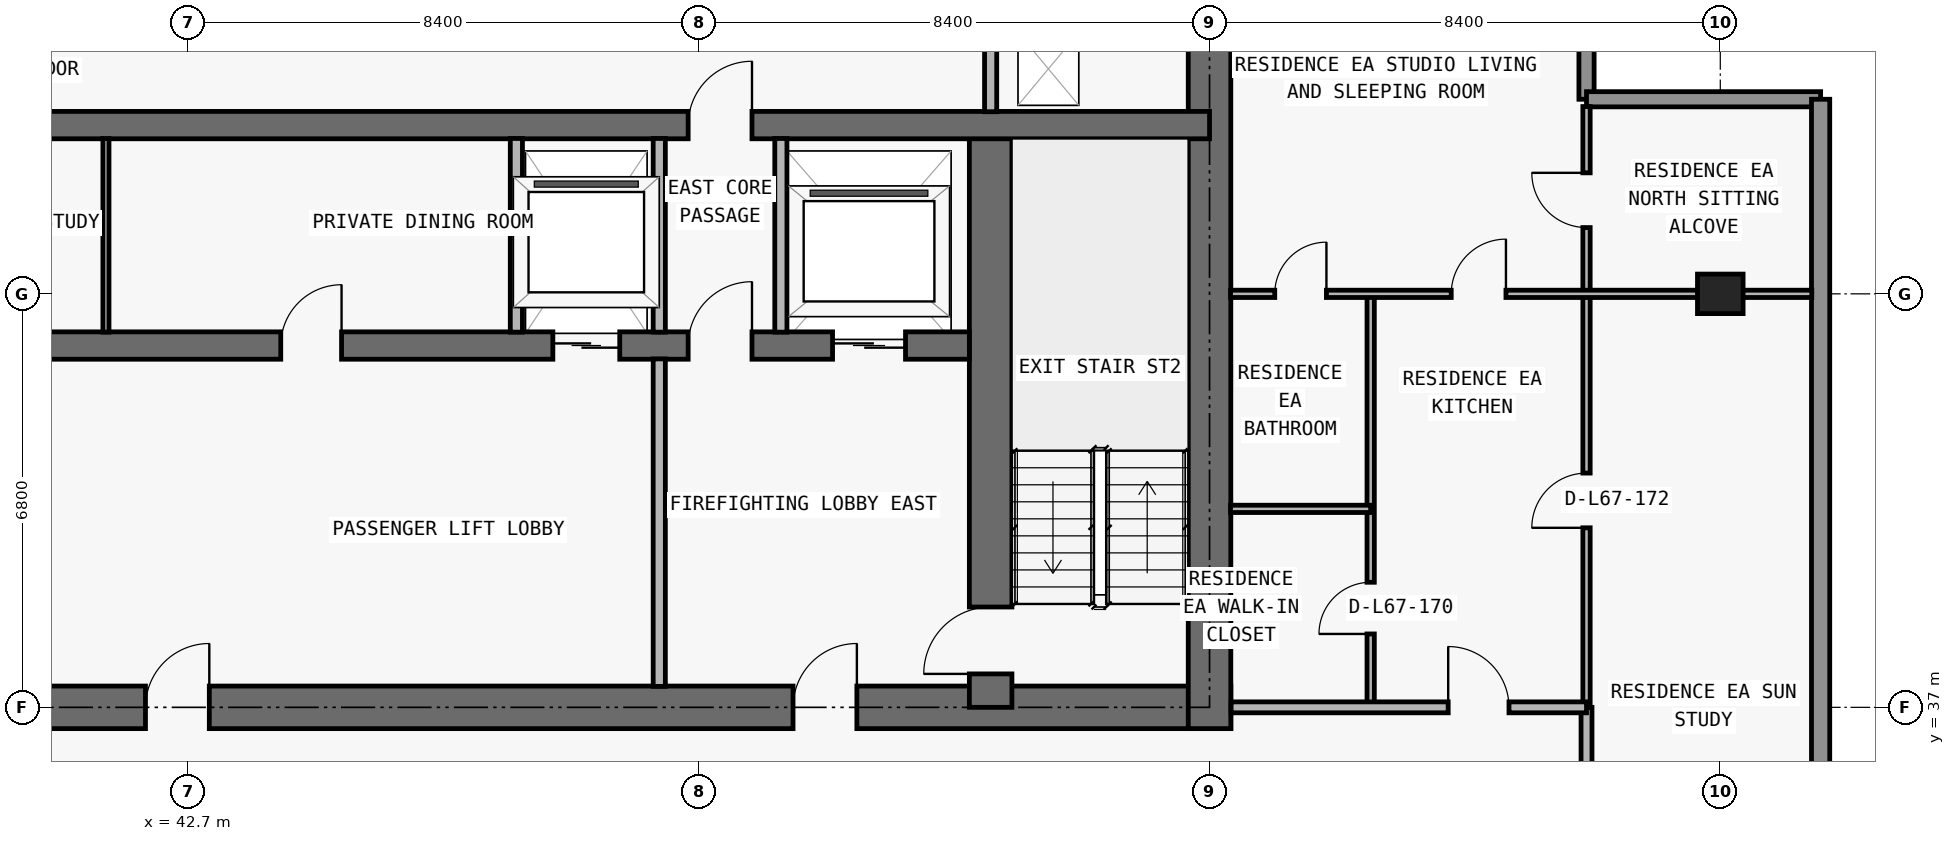
"""IFC4 building model, lengths in metres.
Left out: names, types, materials, properties, quantities, classifications, styles, units other than length and angle.
Written with IfcOpenShell. Run it as: python <this file> out.ifc"""

import sys

from ifc_helpers import new_model, si_unit, direction, frame, frame_2d, origin, origin_2d, place, context, subcontext, project, spatial, rectangle, extrude, element, fill, save


model = new_model("IFC4")
c1 = context("Model", 3, precision=1e-05, world=origin(), true_north=direction((0.0, 1.0)))
c2 = subcontext(c1, "Body", "Model", "MODEL_VIEW")
j1 = project(units=[si_unit("LENGTHUNIT", "METRE"), si_unit("PLANEANGLEUNIT", "RADIAN")], contexts=[c1])
p1 = place(None, origin())
s1 = spatial("IfcSite", under=j1, at=p1, CompositionType="ELEMENT")
p2 = place(p1, origin())
s2 = spatial("IfcBuilding", under=s1, at=p2, CompositionType="ELEMENT")
p3 = place(p2, frame((0.0, 0.0, 239.7)))
s3 = spatial("IfcBuildingStorey", under=s2, at=p3, CompositionType="ELEMENT", Elevation=239.7)
p4 = place(p3, frame((67.9, 43.8, 0.0), z_axis=(0.0, 0.0, 1.0), x_axis=(1.0, 0.0, 0.0)))
e1 = element("IfcColumn", 1, at=p4, inside=s3, PredefinedType="COLUMN", context=c2, shape_type="SweptSolid", body=[
    extrude(rectangle(XDim=0.75, YDim=0.65, at=origin_2d()), origin(), (0.0, 0.0, 1.0), 3.05),
])
p5 = place(p3, frame((17.95, 37.0, 0.0), z_axis=(0.0, 0.0, 1.0), x_axis=(1.0, 0.0, 0.0)))
e2 = element("IfcWall", 2, at=p5, inside=s3, PredefinedType="SHEAR", context=c2, shape_type="SweptSolid", body=[
    extrude(rectangle(XDim=41.9, YDim=0.7, at=frame_2d((20.95, 0.0))), origin(), (0.0, 0.0, 1.0), 3.05),
])
p6 = place(p5, frame((14.35, 0.0, 0.0)))
e3 = element("IfcOpeningElement", 3, at=p6, cuts=e2, PredefinedType="OPENING", context=c2, shape_type="SweptSolid", body=[
    extrude(rectangle(XDim=1.1, YDim=2.15, at=frame_2d((0.55, 1.075))), frame((0.0, 0.36, 0.0), z_axis=(0.0, -1.0, 0.0), x_axis=(1.0, 0.0, 0.0)), (0.0, 0.0, 1.0), 0.72),
])
p7 = place(p5, frame((6.2, 0.0, 0.0)))
e4 = element("IfcOpeningElement", 4, at=p7, cuts=e2, PredefinedType="OPENING", context=c2, shape_type="SweptSolid", body=[
    extrude(rectangle(XDim=1.05, YDim=2.15, at=frame_2d((0.525, 1.075))), frame((0.0, 0.36, 0.0), z_axis=(0.0, -1.0, 0.0), x_axis=(1.0, 0.0, 0.0)), (0.0, 0.0, 1.0), 0.72),
])
p8 = place(p5, frame((34.7, 0.0, 0.0)))
e5 = element("IfcOpeningElement", 5, at=p8, cuts=e2, PredefinedType="OPENING", context=c2, shape_type="SweptSolid", body=[
    extrude(rectangle(XDim=1.05, YDim=2.15, at=frame_2d((0.525, 1.075))), frame((0.0, 0.36, 0.0), z_axis=(0.0, -1.0, 0.0), x_axis=(1.0, 0.0, 0.0)), (0.0, 0.0, 1.0), 0.72),
])
p9 = place(p5, frame((10.812, 0.0, 0.0)))
e6 = element("IfcOpeningElement", 6, at=p9, cuts=e2, PredefinedType="OPENING", context=c2, shape_type="SweptSolid", body=[
    extrude(rectangle(XDim=1.05, YDim=2.15, at=frame_2d((0.525, 1.075))), frame((0.0, 0.36, 0.0), z_axis=(0.0, -1.0, 0.0), x_axis=(1.0, 0.0, 0.0)), (0.0, 0.0, 1.0), 0.72),
])
p10 = place(p5, frame((24.05, 0.0, 0.0)))
e7 = element("IfcOpeningElement", 7, at=p10, cuts=e2, PredefinedType="OPENING", context=c2, shape_type="SweptSolid", body=[
    extrude(rectangle(XDim=1.05, YDim=2.15, at=frame_2d((0.525, 1.075))), frame((0.0, 0.36, 0.0), z_axis=(0.0, -1.0, 0.0), x_axis=(1.0, 0.0, 0.0)), (0.0, 0.0, 1.0), 0.72),
])
p11 = place(p3, frame((59.5, 36.65, 0.0), z_axis=(0.0, 0.0, 1.0), x_axis=(0.0, 1.0, 0.0)))
e8 = element("IfcWall", 8, at=p11, inside=s3, PredefinedType="SHEAR", context=c2, shape_type="SweptSolid", body=[
    extrude(rectangle(XDim=13.95, YDim=0.7, at=frame_2d((6.975, 0.0))), origin(), (0.0, 0.0, 1.0), 3.05),
])
p12 = place(p3, frame((55.9, 37.0, 0.0), z_axis=(0.0, 0.0, 1.0), x_axis=(0.0, 1.0, 0.0)))
e9 = element("IfcWall", 9, at=p12, inside=s3, PredefinedType="SHEAR", context=c2, shape_type="SweptSolid", body=[
    extrude(rectangle(XDim=9.575, YDim=0.7, at=frame_2d((4.788, 0.0))), origin(), (0.0, 0.0, 1.0), 3.05),
])
p13 = place(p12, frame((0.55, 0.0, 0.0)))
e10 = element("IfcOpeningElement", 10, at=p13, cuts=e9, PredefinedType="OPENING", context=c2, shape_type="SweptSolid", body=[
    extrude(rectangle(XDim=1.1, YDim=2.15, at=frame_2d((0.55, 1.075))), frame((0.0, 0.36, 0.0), z_axis=(0.0, -1.0, 0.0), x_axis=(1.0, 0.0, 0.0)), (0.0, 0.0, 1.0), 0.72),
])
p14 = place(p3, frame((22.25, 42.95, 0.0), z_axis=(0.0, 0.0, 1.0), x_axis=(1.0, 0.0, 0.0)))
e11 = element("IfcWall", 11, at=p14, inside=s3, PredefinedType="SHEAR", context=c2, shape_type="SweptSolid", body=[
    extrude(rectangle(XDim=33.3, YDim=0.45, at=frame_2d((16.65, 0.0))), origin(), (0.0, 0.0, 1.0), 3.05),
])
p15 = place(p14, frame((1.05, 0.0, 0.0)))
e12 = element("IfcOpeningElement", 12, at=p15, cuts=e11, PredefinedType="OPENING", context=c2, shape_type="SweptSolid", body=[
    extrude(rectangle(XDim=1.2, YDim=2.2, at=frame_2d((0.6, 1.1))), frame((0.0, 0.235, 0.0), z_axis=(0.0, -1.0, 0.0), x_axis=(1.0, 0.0, 0.0)), (0.0, 0.0, 1.0), 0.47),
])
p16 = place(p14, frame((31.05, 0.0, 0.0)))
e13 = element("IfcOpeningElement", 13, at=p16, cuts=e11, PredefinedType="OPENING", context=c2, shape_type="SweptSolid", body=[
    extrude(rectangle(XDim=1.2, YDim=2.2, at=frame_2d((0.6, 1.1))), frame((0.0, 0.235, 0.0), z_axis=(0.0, -1.0, 0.0), x_axis=(1.0, 0.0, 0.0)), (0.0, 0.0, 1.0), 0.47),
])
p17 = place(p14, frame((26.45, 0.0, 0.0)))
e14 = element("IfcOpeningElement", 14, at=p17, cuts=e11, PredefinedType="OPENING", context=c2, shape_type="SweptSolid", body=[
    extrude(rectangle(XDim=1.1, YDim=2.2, at=frame_2d((0.55, 1.1))), frame((0.0, 0.235, 0.0), z_axis=(0.0, -1.0, 0.0), x_axis=(1.0, 0.0, 0.0)), (0.0, 0.0, 1.0), 0.47),
])
p18 = place(p14, frame((5.95, 0.0, 0.0)))
e15 = element("IfcOpeningElement", 15, at=p18, cuts=e11, PredefinedType="OPENING", context=c2, shape_type="SweptSolid", body=[
    extrude(rectangle(XDim=1.1, YDim=2.2, at=frame_2d((0.55, 1.1))), frame((0.0, 0.235, 0.0), z_axis=(0.0, -1.0, 0.0), x_axis=(1.0, 0.0, 0.0)), (0.0, 0.0, 1.0), 0.47),
])
p19 = place(p14, frame((3.625, 0.0, 0.0)))
e16 = element("IfcOpeningElement", 16, at=p19, cuts=e11, PredefinedType="OPENING", context=c2, shape_type="SweptSolid", body=[
    extrude(rectangle(XDim=1.05, YDim=2.15, at=frame_2d((0.525, 1.075))), frame((0.0, 0.235, 0.0), z_axis=(0.0, -1.0, 0.0), x_axis=(1.0, 0.0, 0.0)), (0.0, 0.0, 1.0), 0.47),
])
p20 = place(p14, frame((28.675, 0.0, 0.0)))
e17 = element("IfcOpeningElement", 17, at=p20, cuts=e11, PredefinedType="OPENING", context=c2, shape_type="SweptSolid", body=[
    extrude(rectangle(XDim=1.05, YDim=2.15, at=frame_2d((0.525, 1.075))), frame((0.0, 0.235, 0.0), z_axis=(0.0, -1.0, 0.0), x_axis=(1.0, 0.0, 0.0)), (0.0, 0.0, 1.0), 0.47),
])
p21 = place(p14, frame((15.225, 0.0, 0.0)))
e18 = element("IfcOpeningElement", 18, at=p21, cuts=e11, PredefinedType="OPENING", context=c2, shape_type="SweptSolid", body=[
    extrude(rectangle(XDim=1.0, YDim=2.2, at=frame_2d((0.5, 1.1))), frame((0.0, 0.235, 0.0), z_axis=(0.0, -1.0, 0.0), x_axis=(1.0, 0.0, 0.0)), (0.0, 0.0, 1.0), 0.47),
])
p22 = place(p14, frame((21.975, 0.0, 0.0)))
e19 = element("IfcOpeningElement", 19, at=p22, cuts=e11, PredefinedType="OPENING", context=c2, shape_type="SweptSolid", body=[
    extrude(rectangle(XDim=1.0, YDim=2.2, at=frame_2d((0.5, 1.1))), frame((0.0, 0.235, 0.0), z_axis=(0.0, -1.0, 0.0), x_axis=(1.0, 0.0, 0.0)), (0.0, 0.0, 1.0), 0.47),
])
p23 = place(p3, frame((18.3, 46.575, 0.0), z_axis=(0.0, 0.0, 1.0), x_axis=(1.0, 0.0, 0.0)))
e20 = element("IfcWall", 20, at=p23, inside=s3, PredefinedType="SHEAR", context=c2, shape_type="SweptSolid", body=[
    extrude(rectangle(XDim=41.2, YDim=0.45, at=frame_2d((20.6, 0.0))), origin(), (0.0, 0.0, 1.0), 3.05),
])
p24 = place(p23, frame((7.575, 0.0, 0.0)))
e21 = element("IfcOpeningElement", 21, at=p24, cuts=e20, PredefinedType="OPENING", context=c2, shape_type="SweptSolid", body=[
    extrude(rectangle(XDim=1.05, YDim=2.15, at=frame_2d((0.525, 1.075))), frame((0.0, 0.235, 0.0), z_axis=(0.0, -1.0, 0.0), x_axis=(1.0, 0.0, 0.0)), (0.0, 0.0, 1.0), 0.47),
])
p25 = place(p23, frame((32.625, 0.0, 0.0)))
e22 = element("IfcOpeningElement", 22, at=p25, cuts=e20, PredefinedType="OPENING", context=c2, shape_type="SweptSolid", body=[
    extrude(rectangle(XDim=1.05, YDim=2.15, at=frame_2d((0.525, 1.075))), frame((0.0, 0.235, 0.0), z_axis=(0.0, -1.0, 0.0), x_axis=(1.0, 0.0, 0.0)), (0.0, 0.0, 1.0), 0.47),
])
p26 = place(p3, frame((65.7, 50.45, 0.0), z_axis=(0.0, 0.0, 1.0), x_axis=(0.0, -1.0, 0.0)))
e23 = element("IfcWall", 23, at=p26, inside=s3, PredefinedType="ELEMENTEDWALL", context=c2, shape_type="SweptSolid", body=[
    extrude(rectangle(XDim=3.45, YDim=0.25, at=frame_2d((1.725, 0.0))), origin(), (0.0, 0.0, 1.0), 3.05),
])
p27 = place(p3, frame((65.7, 47.0, 0.0), z_axis=(0.0, 0.0, 1.0), x_axis=(1.0, 0.0, 0.0)))
e24 = element("IfcWall", 24, at=p27, inside=s3, PredefinedType="ELEMENTEDWALL", context=c2, shape_type="SweptSolid", body=[
    extrude(rectangle(XDim=3.85, YDim=0.25, at=frame_2d((1.925, 0.0))), origin(), (0.0, 0.0, 1.0), 3.05),
])
p28 = place(p3, frame((69.55, 47.0, 0.0), z_axis=(0.0, 0.0, 1.0), x_axis=(0.0, -1.0, 0.0)))
e25 = element("IfcWall", 25, at=p28, inside=s3, PredefinedType="STANDARD", context=c2, shape_type="SweptSolid", body=[
    extrude(rectangle(XDim=16.85, YDim=0.3, at=frame_2d((8.425, 0.0))), origin(), (0.0, 0.0, 1.0), 3.05),
])
p29 = place(p3, frame((41.35, 43.17, 0.0), z_axis=(0.0, 0.0, 1.0), x_axis=(0.0, 1.0, 0.0)))
e26 = element("IfcWall", 26, at=p29, inside=s3, PredefinedType="MOVABLE", context=c2, shape_type="SweptSolid", body=[
    extrude(rectangle(XDim=3.185, YDim=0.1, at=frame_2d((1.593, 0.0))), origin(), (0.0, 0.0, 1.0), 3.05),
])
p30 = place(p3, frame((48.1, 43.17, 0.0), z_axis=(0.0, 0.0, 1.0), x_axis=(0.0, 1.0, 0.0)))
e27 = element("IfcWall", 27, at=p30, inside=s3, PredefinedType="PARTITIONING", context=c2, shape_type="SweptSolid", body=[
    extrude(rectangle(XDim=3.185, YDim=0.2, at=frame_2d((1.593, 0.0))), origin(), (0.0, 0.0, 1.0), 3.05),
])
p31 = place(p3, frame((50.45, 37.345, 0.0), z_axis=(0.0, 0.0, 1.0), x_axis=(0.0, 1.0, 0.0)))
e28 = element("IfcWall", 28, at=p31, inside=s3, PredefinedType="PARTITIONING", context=c2, shape_type="SweptSolid", body=[
    extrude(rectangle(XDim=5.385, YDim=0.2, at=frame_2d((2.692, 0.0))), origin(), (0.0, 0.0, 1.0), 3.05),
])
for number, where, z_axis, x_axis in (
    (29, (50.45, 43.17, 0.0), (0.0, 0.0, 1.0), (0.0, 1.0, 0.0)),
    (30, (52.45, 43.17, 0.0), (0.0, 0.0, 1.0), (0.0, 1.0, 0.0)),
):
    element("IfcWall", number, at=place(p3, frame(where, z_axis=z_axis, x_axis=x_axis)), inside=s3, PredefinedType="PARTITIONING", context=c2, shape_type="SweptSolid", body=[
        extrude(rectangle(XDim=3.185, YDim=0.2, at=frame_2d((1.593, 0.0))), origin(), (0.0, 0.0, 1.0), 3.05),
    ])
p32 = place(p3, frame((55.9, 46.795, 0.0), z_axis=(0.0, 0.0, 1.0), x_axis=(0.0, 1.0, 0.0)))
e31 = element("IfcWall", 31, at=p32, inside=s3, PredefinedType="PARTITIONING", context=c2, shape_type="SweptSolid", body=[
    extrude(rectangle(XDim=3.16, YDim=0.2, at=frame_2d((1.58, 0.0))), origin(), (0.0, 0.0, 1.0), 3.05),
])
p33 = place(p3, frame((62.15, 37.0, 0.0), z_axis=(0.0, 0.0, 1.0), x_axis=(0.0, 1.0, 0.0)))
e32 = element("IfcWall", 32, at=p33, inside=s3, PredefinedType="PARTITIONING", context=c2, shape_type="SweptSolid", body=[
    extrude(rectangle(XDim=6.8, YDim=0.12, at=frame_2d((3.4, 0.0))), origin(), (0.0, 0.0, 1.0), 3.05),
])
p34 = place(p33, frame((1.207, 0.0, 0.0)))
e33 = element("IfcOpeningElement", 33, at=p34, cuts=e32, PredefinedType="OPENING", context=c2, shape_type="SweptSolid", body=[
    extrude(rectangle(XDim=0.85, YDim=2.1, at=frame_2d((0.425, 1.05))), frame((0.0, 0.07, 0.0), z_axis=(0.0, -1.0, 0.0), x_axis=(1.0, 0.0, 0.0)), (0.0, 0.0, 1.0), 0.14),
])
p35 = place(p3, frame((65.7, 34.005, 0.0), z_axis=(0.0, 0.0, 1.0), x_axis=(0.0, 1.0, 0.0)))
e34 = element("IfcWall", 34, at=p35, inside=s3, PredefinedType="PARTITIONING", context=c2, shape_type="SweptSolid", body=[
    extrude(rectangle(XDim=2.995, YDim=0.18, at=frame_2d((1.498, 0.0))), origin(), (0.0, 0.0, 1.0), 3.05),
])
p36 = place(p3, frame((65.7, 37.005, 0.0), z_axis=(0.0, 0.0, 1.0), x_axis=(0.0, 1.0, 0.0)))
e35 = element("IfcWall", 35, at=p36, inside=s3, PredefinedType="PARTITIONING", context=c2, shape_type="SweptSolid", body=[
    extrude(rectangle(XDim=9.875, YDim=0.12, at=frame_2d((4.938, 0.0))), origin(), (0.0, 0.0, 1.0), 3.05),
])
p37 = place(p36, frame((2.948, 0.0, 0.0)))
e36 = element("IfcOpeningElement", 36, at=p37, cuts=e35, PredefinedType="OPENING", context=c2, shape_type="SweptSolid", body=[
    extrude(rectangle(XDim=0.9, YDim=2.15, at=frame_2d((0.45, 1.075))), frame((0.0, 0.07, 0.0), z_axis=(0.0, -1.0, 0.0), x_axis=(1.0, 0.0, 0.0)), (0.0, 0.0, 1.0), 0.14),
])
p38 = place(p36, frame((7.885, 0.0, 0.0)))
e37 = element("IfcOpeningElement", 37, at=p38, cuts=e35, PredefinedType="OPENING", context=c2, shape_type="SweptSolid", body=[
    extrude(rectangle(XDim=0.9, YDim=2.15, at=frame_2d((0.45, 1.075))), frame((0.0, 0.07, 0.0), z_axis=(0.0, -1.0, 0.0), x_axis=(1.0, 0.0, 0.0)), (0.0, 0.0, 1.0), 0.14),
])
p39 = place(p3, frame((59.855, 37.0, 0.0), z_axis=(0.0, 0.0, 1.0), x_axis=(1.0, 0.0, 0.0)))
e38 = element("IfcWall", 38, at=p39, inside=s3, PredefinedType="PARTITIONING", context=c2, shape_type="SweptSolid", body=[
    extrude(rectangle(XDim=5.845, YDim=0.18, at=frame_2d((2.922, 0.0))), origin(), (0.0, 0.0, 1.0), 3.05),
])
p40 = place(p39, frame((3.57, 0.0, 0.0)))
e39 = element("IfcOpeningElement", 39, at=p40, cuts=e38, PredefinedType="OPENING", context=c2, shape_type="SweptSolid", body=[
    extrude(rectangle(XDim=1.0, YDim=2.2, at=frame_2d((0.5, 1.1))), frame((0.0, 0.1, 0.0), z_axis=(0.0, -1.0, 0.0), x_axis=(1.0, 0.0, 0.0)), (0.0, 0.0, 1.0), 0.2),
])
p41 = place(p3, frame((59.845, 40.264, 0.0), z_axis=(0.0, 0.0, 1.0), x_axis=(1.0, 0.0, 0.0)))
e40 = element("IfcWall", 40, at=p41, inside=s3, PredefinedType="PARTITIONING", context=c2, shape_type="SweptSolid", body=[
    extrude(rectangle(XDim=2.305, YDim=0.12, at=frame_2d((1.152, 0.0))), origin(), (0.0, 0.0, 1.0), 3.05),
])
p42 = place(p3, frame((59.845, 43.8, 0.0), z_axis=(0.0, 0.0, 1.0), x_axis=(1.0, 0.0, 0.0)))
e41 = element("IfcWall", 41, at=p42, inside=s3, PredefinedType="PARTITIONING", context=c2, shape_type="SweptSolid", body=[
    extrude(rectangle(XDim=9.56, YDim=0.12, at=frame_2d((4.78, 0.0))), origin(), (0.0, 0.0, 1.0), 2.418),
])
p43 = place(p42, frame((3.63, 0.0, 0.0)))
e42 = element("IfcOpeningElement", 42, at=p43, cuts=e41, PredefinedType="OPENING", context=c2, shape_type="SweptSolid", body=[
    extrude(rectangle(XDim=0.9, YDim=2.15, at=frame_2d((0.45, 1.075))), frame((0.0, 0.07, 0.0), z_axis=(0.0, -1.0, 0.0), x_axis=(1.0, 0.0, 0.0)), (0.0, 0.0, 1.0), 0.14),
])
p44 = place(p42, frame((0.728, 0.0, 0.0)))
e43 = element("IfcOpeningElement", 43, at=p44, cuts=e41, PredefinedType="OPENING", context=c2, shape_type="SweptSolid", body=[
    extrude(rectangle(XDim=0.85, YDim=2.1, at=frame_2d((0.425, 1.05))), frame((0.0, 0.07, 0.0), z_axis=(0.0, -1.0, 0.0), x_axis=(1.0, 0.0, 0.0)), (0.0, 0.0, 1.0), 0.14),
])
p45 = place(p16, origin())
e44 = element("IfcDoor", 44, at=p45, inside=s3, OperationType="DOUBLE_DOOR_SLIDING", PredefinedType="DOOR", context=c2, shape_type="SweptSolid", body=[
    extrude(rectangle(XDim=1.2, YDim=2.2, at=frame_2d((0.6, 1.1))), frame((0.0, 0.025, 0.0), z_axis=(0.0, -1.0, 0.0), x_axis=(1.0, 0.0, 0.0)), (0.0, 0.0, 1.0), 0.05),
])
fill(e13, e44)
p46 = place(p17, origin())
e45 = element("IfcDoor", 45, at=p46, inside=s3, OperationType="DOUBLE_DOOR_SLIDING", PredefinedType="DOOR", context=c2, shape_type="SweptSolid", body=[
    extrude(rectangle(XDim=1.1, YDim=2.2, at=frame_2d((0.55, 1.1))), frame((0.0, 0.025, 0.0), z_axis=(0.0, -1.0, 0.0), x_axis=(1.0, 0.0, 0.0)), (0.0, 0.0, 1.0), 0.05),
])
fill(e14, e45)
p47 = place(p8, origin())
e46 = element("IfcDoor", 46, at=p47, inside=s3, OperationType="SINGLE_SWING_RIGHT", PredefinedType="DOOR", context=c2, shape_type="SweptSolid", body=[
    extrude(rectangle(XDim=1.05, YDim=2.15, at=frame_2d((0.525, 1.075))), frame((0.0, 0.025, 0.0), z_axis=(0.0, -1.0, 0.0), x_axis=(1.0, 0.0, 0.0)), (0.0, 0.0, 1.0), 0.05),
])
fill(e5, e46)
p48 = place(p13, origin())
e47 = element("IfcDoor", 47, at=p48, inside=s3, OperationType="SINGLE_SWING_LEFT", PredefinedType="DOOR", context=c2, shape_type="SweptSolid", body=[
    extrude(rectangle(XDim=1.1, YDim=2.15, at=frame_2d((0.55, 1.075))), frame((0.0, 0.025, 0.0), z_axis=(0.0, -1.0, 0.0), x_axis=(1.0, 0.0, 0.0)), (0.0, 0.0, 1.0), 0.05),
])
fill(e10, e47)
p49 = place(p20, origin())
e48 = element("IfcDoor", 48, at=p49, inside=s3, OperationType="SINGLE_SWING_RIGHT", PredefinedType="DOOR", context=c2, shape_type="SweptSolid", body=[
    extrude(rectangle(XDim=1.05, YDim=2.15, at=frame_2d((0.525, 1.075))), frame((0.0, 0.025, 0.0), z_axis=(0.0, -1.0, 0.0), x_axis=(1.0, 0.0, 0.0)), (0.0, 0.0, 1.0), 0.05),
])
fill(e17, e48)
p50 = place(p10, origin())
e49 = element("IfcDoor", 49, at=p50, inside=s3, OperationType="SINGLE_SWING_RIGHT", PredefinedType="DOOR", context=c2, shape_type="SweptSolid", body=[
    extrude(rectangle(XDim=1.05, YDim=2.15, at=frame_2d((0.525, 1.075))), frame((0.0, 0.025, 0.0), z_axis=(0.0, -1.0, 0.0), x_axis=(1.0, 0.0, 0.0)), (0.0, 0.0, 1.0), 0.05),
])
fill(e7, e49)
p51 = place(p22, origin())
e50 = element("IfcDoor", 50, at=p51, inside=s3, OperationType="SINGLE_SWING_RIGHT", PredefinedType="DOOR", context=c2, shape_type="SweptSolid", body=[
    extrude(rectangle(XDim=1.0, YDim=2.2, at=frame_2d((0.5, 1.1))), frame((0.0, 0.025, 0.0), z_axis=(0.0, -1.0, 0.0), x_axis=(1.0, 0.0, 0.0)), (0.0, 0.0, 1.0), 0.05),
])
fill(e19, e50)
p52 = place(p25, origin())
e51 = element("IfcDoor", 51, at=p52, inside=s3, OperationType="SINGLE_SWING_RIGHT", PredefinedType="DOOR", context=c2, shape_type="SweptSolid", body=[
    extrude(rectangle(XDim=1.05, YDim=2.15, at=frame_2d((0.525, 1.075))), frame((0.0, 0.025, 0.0), z_axis=(0.0, -1.0, 0.0), x_axis=(1.0, 0.0, 0.0)), (0.0, 0.0, 1.0), 0.05),
])
fill(e22, e51)
p53 = place(p40, origin())
e52 = element("IfcDoor", 52, at=p53, inside=s3, OperationType="SINGLE_SWING_LEFT", PredefinedType="DOOR", context=c2, shape_type="SweptSolid", body=[
    extrude(rectangle(XDim=1.0, YDim=2.2, at=frame_2d((0.5, 1.1))), frame((0.0, 0.025, 0.0), z_axis=(0.0, -1.0, 0.0), x_axis=(1.0, 0.0, 0.0)), (0.0, 0.0, 1.0), 0.05),
])
fill(e39, e52)
p54 = place(p43, origin())
e53 = element("IfcDoor", 53, at=p54, inside=s3, OperationType="SINGLE_SWING_RIGHT", PredefinedType="DOOR", context=c2, shape_type="SweptSolid", body=[
    extrude(rectangle(XDim=0.9, YDim=2.15, at=frame_2d((0.45, 1.075))), frame((0.0, 0.025, 0.0), z_axis=(0.0, -1.0, 0.0), x_axis=(1.0, 0.0, 0.0)), (0.0, 0.0, 1.0), 0.05),
])
fill(e42, e53)
p55 = place(p34, origin())
e54 = element("IfcDoor", 54, at=p55, inside=s3, OperationType="SINGLE_SWING_LEFT", PredefinedType="DOOR", context=c2, shape_type="SweptSolid", body=[
    extrude(rectangle(XDim=0.85, YDim=2.1, at=frame_2d((0.425, 1.05))), frame((0.0, 0.025, 0.0), z_axis=(0.0, -1.0, 0.0), x_axis=(1.0, 0.0, 0.0)), (0.0, 0.0, 1.0), 0.05),
])
fill(e33, e54)
p56 = place(p44, origin())
e55 = element("IfcDoor", 55, at=p56, inside=s3, OperationType="SINGLE_SWING_RIGHT", PredefinedType="DOOR", context=c2, shape_type="SweptSolid", body=[
    extrude(rectangle(XDim=0.85, YDim=2.1, at=frame_2d((0.425, 1.05))), frame((0.0, 0.025, 0.0), z_axis=(0.0, -1.0, 0.0), x_axis=(1.0, 0.0, 0.0)), (0.0, 0.0, 1.0), 0.05),
])
fill(e43, e55)
p57 = place(p37, origin())
e56 = element("IfcDoor", 56, at=p57, inside=s3, OperationType="SINGLE_SWING_LEFT", PredefinedType="DOOR", context=c2, shape_type="SweptSolid", body=[
    extrude(rectangle(XDim=0.9, YDim=2.15, at=frame_2d((0.45, 1.075))), frame((0.0, 0.025, 0.0), z_axis=(0.0, -1.0, 0.0), x_axis=(1.0, 0.0, 0.0)), (0.0, 0.0, 1.0), 0.05),
])
fill(e36, e56)
p58 = place(p38, origin())
e57 = element("IfcDoor", 57, at=p58, inside=s3, OperationType="SINGLE_SWING_RIGHT", PredefinedType="DOOR", context=c2, shape_type="SweptSolid", body=[
    extrude(rectangle(XDim=0.9, YDim=2.15, at=frame_2d((0.45, 1.075))), frame((0.0, 0.025, 0.0), z_axis=(0.0, -1.0, 0.0), x_axis=(1.0, 0.0, 0.0)), (0.0, 0.0, 1.0), 0.05),
])
fill(e37, e57)
save(model, sys.argv[1])
